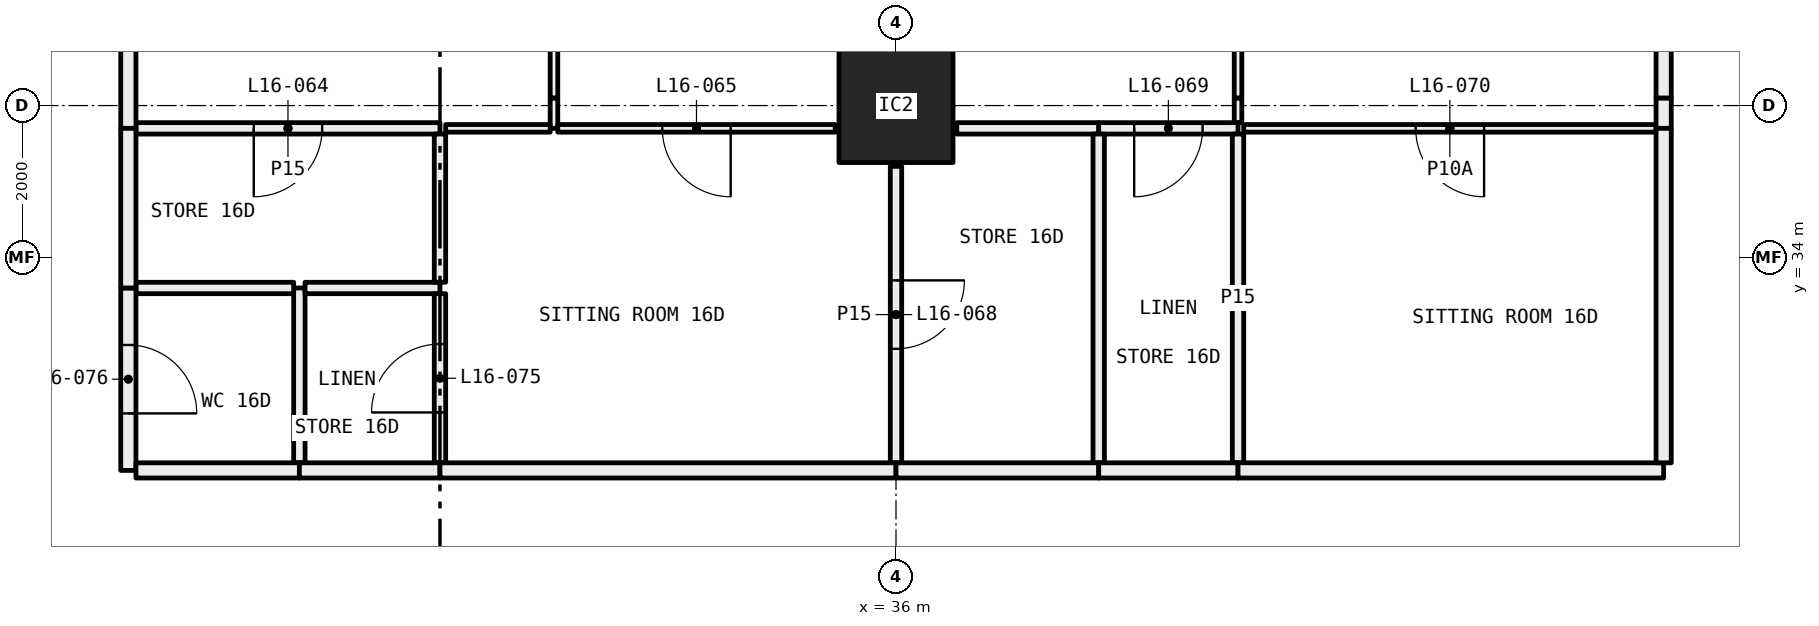
"""IFC4 building model, lengths in metres.
Left out: names, types, materials, properties, quantities, classifications, styles, units other than length and angle.
Written with IfcOpenShell. Run it as: python <this file> out.ifc"""

import sys

from ifc_helpers import new_model, si_unit, direction, frame, frame_2d, origin, origin_2d, place, context, subcontext, project, spatial, rectangle, hollow_rectangle, extrude, element, fill, save


model = new_model("IFC4")
c1 = context("Model", 3, precision=1e-05, world=origin(), true_north=direction((0.0, 1.0)))
c2 = subcontext(c1, "Body", "Model", "MODEL_VIEW")
j1 = project(units=[si_unit("LENGTHUNIT", "METRE"), si_unit("PLANEANGLEUNIT", "RADIAN")], contexts=[c1])
p1 = place(None, origin())
s1 = spatial("IfcSite", under=j1, at=p1, CompositionType="ELEMENT")
p2 = place(p1, origin())
s2 = spatial("IfcBuilding", under=s1, at=p2, CompositionType="ELEMENT")
p3 = place(p2, frame((0.0, 0.0, 67.95)))
s3 = spatial("IfcBuildingStorey", under=s2, at=p3, CompositionType="ELEMENT", Elevation=67.95)
p4 = place(p3, frame((36.0, 36.0, 0.0), z_axis=(0.0, 0.0, 1.0), x_axis=(1.0, 0.0, 0.0)))
e1 = element("IfcColumn", 1, at=p4, inside=s3, PredefinedType="COLUMN", context=c2, shape_type="SweptSolid", body=[
    extrude(hollow_rectangle(XDim=1.5, YDim=1.5, WallThickness=0.065, at=origin_2d()), origin(), (0.0, 0.0, 1.0), 3.05),
])
p5 = place(p3, frame((31.5, 35.7, 0.0), z_axis=(0.0, 0.0, 1.0), x_axis=(0.0, 1.0, 0.0)))
e2 = element("IfcWall", 2, at=p5, inside=s3, PredefinedType="PARTITIONING", context=c2, shape_type="SweptSolid", body=[
    extrude(rectangle(XDim=0.4, YDim=0.1, at=frame_2d((0.2, 0.0))), origin(), (0.0, 0.0, 1.0), 2.45),
])
p6 = place(p3, frame((31.5, 36.1, 0.0), z_axis=(0.0, 0.0, 1.0), x_axis=(0.0, 1.0, 0.0)))
e3 = element("IfcWall", 3, at=p6, inside=s3, PredefinedType="PARTITIONING", context=c2, shape_type="SweptSolid", body=[
    extrude(rectangle(XDim=5.825, YDim=0.1, at=frame_2d((2.913, 0.0))), origin(), (0.0, 0.0, 1.0), 3.05),
])
p7 = place(p6, frame((2.462, 0.0, 0.0)))
e4 = element("IfcOpeningElement", 4, at=p7, cuts=e3, PredefinedType="OPENING", context=c2, shape_type="SweptSolid", body=[
    extrude(rectangle(XDim=0.9, YDim=2.1, at=frame_2d((0.45, 1.05))), frame((0.0, 0.06, 0.0), z_axis=(0.0, -1.0, 0.0), x_axis=(1.0, 0.0, 0.0)), (0.0, 0.0, 1.0), 0.12),
])
p8 = place(p3, frame((26.0, 35.7, 0.0), z_axis=(0.0, 0.0, 1.0), x_axis=(1.0, 0.0, 0.0)))
e5 = element("IfcWall", 5, at=p8, inside=s3, PredefinedType="PARTITIONING", context=c2, shape_type="SweptSolid", body=[
    extrude(rectangle(XDim=4.0, YDim=0.15, at=frame_2d((2.0, 0.0))), origin(), (0.0, 0.0, 1.0), 3.05),
])
p9 = place(p8, frame((1.55, 0.0, 0.0)))
e6 = element("IfcOpeningElement", 6, at=p9, cuts=e5, PredefinedType="OPENING", context=c2, shape_type="SweptSolid", body=[
    extrude(rectangle(XDim=0.9, YDim=2.1, at=frame_2d((0.45, 1.05))), frame((0.0, 0.085, 0.0), z_axis=(0.0, -1.0, 0.0), x_axis=(1.0, 0.0, 0.0)), (0.0, 0.0, 1.0), 0.17),
])
p10 = place(p3, frame((30.075, 35.7, 0.0), z_axis=(0.0, 0.0, 1.0), x_axis=(1.0, 0.0, 0.0)))
e7 = element("IfcWall", 7, at=p10, inside=s3, PredefinedType="PARTITIONING", context=c2, shape_type="SweptSolid", body=[
    extrude(rectangle(XDim=1.375, YDim=0.1, at=frame_2d((0.688, 0.0))), origin(), (0.0, 0.0, 1.0), 3.05),
])
p11 = place(p3, frame((25.9, 41.9, 0.0), z_axis=(0.0, 0.0, 1.0), x_axis=(0.0, -1.0, 0.0)))
e8 = element("IfcWall", 8, at=p11, inside=s3, PredefinedType="PARTITIONING", context=c2, shape_type="SweptSolid", body=[
    extrude(rectangle(XDim=6.2, YDim=0.2, at=frame_2d((3.1, 0.0))), origin(), (0.0, 0.0, 1.0), 2.45),
])
p12 = place(p3, frame((31.55, 35.7, 0.0), z_axis=(0.0, 0.0, 1.0), x_axis=(1.0, 0.0, 0.0)))
e9 = element("IfcWall", 9, at=p12, inside=s3, PredefinedType="PARTITIONING", context=c2, shape_type="SweptSolid", body=[
    extrude(rectangle(XDim=3.65, YDim=0.1, at=frame_2d((1.825, 0.0))), origin(), (0.0, 0.0, 1.0), 3.05),
])
p13 = place(p12, frame((1.375, 0.0, 0.0)))
e10 = element("IfcOpeningElement", 10, at=p13, cuts=e9, PredefinedType="OPENING", context=c2, shape_type="SweptSolid", body=[
    extrude(rectangle(XDim=0.9, YDim=2.1, at=frame_2d((0.45, 1.05))), frame((0.0, 0.06, 0.0), z_axis=(0.0, -1.0, 0.0), x_axis=(1.0, 0.0, 0.0)), (0.0, 0.0, 1.0), 0.12),
])
p14 = place(p3, frame((28.15, 31.3, 0.0), z_axis=(0.0, 0.0, 1.0), x_axis=(0.0, 1.0, 0.0)))
e11 = element("IfcWall", 11, at=p14, inside=s3, PredefinedType="PARTITIONING", context=c2, shape_type="SweptSolid", body=[
    extrude(rectangle(XDim=2.3, YDim=0.15, at=frame_2d((1.15, 0.0))), origin(), (0.0, 0.0, 1.0), 3.05),
])
p15 = place(p3, frame((28.075, 33.6, 0.0), z_axis=(0.0, 0.0, 1.0), x_axis=(-1.0, 0.0, 0.0)))
e12 = element("IfcWall", 12, at=p15, inside=s3, PredefinedType="PARTITIONING", context=c2, shape_type="SweptSolid", body=[
    extrude(rectangle(XDim=2.075, YDim=0.15, at=frame_2d((1.038, 0.0))), origin(), (0.0, 0.0, 1.0), 3.05),
])
p16 = place(p3, frame((25.9, 33.6, 0.0), z_axis=(0.0, 0.0, 1.0), x_axis=(0.0, -1.0, 0.0)))
e13 = element("IfcWall", 13, at=p16, inside=s3, PredefinedType="PARTITIONING", context=c2, shape_type="SweptSolid", body=[
    extrude(rectangle(XDim=2.4, YDim=0.2, at=frame_2d((1.2, 0.0))), origin(), (0.0, 0.0, 1.0), 3.05),
])
p17 = place(p16, frame((0.75, 0.0, 0.0)))
e14 = element("IfcOpeningElement", 14, at=p17, cuts=e13, PredefinedType="OPENING", context=c2, shape_type="SweptSolid", body=[
    extrude(rectangle(XDim=0.9, YDim=2.1, at=frame_2d((0.45, 1.05))), frame((0.0, 0.11, 0.0), z_axis=(0.0, -1.0, 0.0), x_axis=(1.0, 0.0, 0.0)), (0.0, 0.0, 1.0), 0.22),
])
p18 = place(p3, frame((26.0, 31.2, 0.0), z_axis=(0.0, 0.0, 1.0), x_axis=(1.0, 0.0, 0.0)))
e15 = element("IfcWall", 15, at=p18, inside=s3, PredefinedType="PARTITIONING", context=c2, shape_type="SweptSolid", body=[
    extrude(rectangle(XDim=2.15, YDim=0.2, at=frame_2d((1.075, 0.0))), origin(), (0.0, 0.0, 1.0), 3.05),
])
p19 = place(p3, frame((30.0, 33.6, 0.0), z_axis=(0.0, 0.0, 1.0), x_axis=(-1.0, 0.0, 0.0)))
e16 = element("IfcWall", 16, at=p19, inside=s3, PredefinedType="PARTITIONING", context=c2, shape_type="SweptSolid", body=[
    extrude(rectangle(XDim=1.775, YDim=0.15, at=frame_2d((0.887, 0.0))), origin(), (0.0, 0.0, 1.0), 3.05),
])
p20 = place(p3, frame((30.0, 31.3, 0.0), z_axis=(0.0, 0.0, 1.0), x_axis=(0.0, 1.0, 0.0)))
e17 = element("IfcWall", 17, at=p20, inside=s3, PredefinedType="PARTITIONING", context=c2, shape_type="SweptSolid", body=[
    extrude(rectangle(XDim=2.225, YDim=0.15, at=frame_2d((1.112, 0.0))), origin(), (0.0, 0.0, 1.0), 3.05),
])
p21 = place(p20, frame((0.663, 0.0, 0.0)))
e18 = element("IfcOpeningElement", 18, at=p21, cuts=e17, PredefinedType="OPENING", context=c2, shape_type="SweptSolid", body=[
    extrude(rectangle(XDim=0.9, YDim=2.1, at=frame_2d((0.45, 1.05))), frame((0.0, 0.085, 0.0), z_axis=(0.0, -1.0, 0.0), x_axis=(1.0, 0.0, 0.0)), (0.0, 0.0, 1.0), 0.17),
])
p22 = place(p3, frame((28.15, 31.2, 0.0), z_axis=(0.0, 0.0, 1.0), x_axis=(1.0, 0.0, 0.0)))
e19 = element("IfcWall", 19, at=p22, inside=s3, PredefinedType="PARTITIONING", context=c2, shape_type="SweptSolid", body=[
    extrude(rectangle(XDim=1.85, YDim=0.2, at=frame_2d((0.925, 0.0))), origin(), (0.0, 0.0, 1.0), 3.05),
])
p23 = place(p3, frame((30.0, 33.675, 0.0), z_axis=(0.0, 0.0, 1.0), x_axis=(0.0, 1.0, 0.0)))
e20 = element("IfcWall", 20, at=p23, inside=s3, PredefinedType="PARTITIONING", context=c2, shape_type="SweptSolid", body=[
    extrude(rectangle(XDim=1.95, YDim=0.15, at=frame_2d((0.975, 0.0))), origin(), (0.0, 0.0, 1.0), 3.05),
])
p24 = place(p3, frame((25.9, 35.7, 0.0), z_axis=(0.0, 0.0, 1.0), x_axis=(0.0, -1.0, 0.0)))
e21 = element("IfcWall", 21, at=p24, inside=s3, PredefinedType="PARTITIONING", context=c2, shape_type="SweptSolid", body=[
    extrude(rectangle(XDim=2.1, YDim=0.2, at=frame_2d((1.05, 0.0))), origin(), (0.0, 0.0, 1.0), 3.05),
])
p25 = place(p3, frame((36.0, 31.3, 0.0), z_axis=(0.0, 0.0, 1.0), x_axis=(0.0, 1.0, 0.0)))
e22 = element("IfcWall", 22, at=p25, inside=s3, PredefinedType="PARTITIONING", context=c2, shape_type="SweptSolid", body=[
    extrude(rectangle(XDim=3.9, YDim=0.15, at=frame_2d((1.95, 0.0))), origin(), (0.0, 0.0, 1.0), 2.45),
])
p26 = place(p25, frame((1.5, 0.0, 0.0)))
e23 = element("IfcOpeningElement", 23, at=p26, cuts=e22, PredefinedType="OPENING", context=c2, shape_type="SweptSolid", body=[
    extrude(rectangle(XDim=0.9, YDim=2.1, at=frame_2d((0.45, 1.05))), frame((0.0, 0.085, 0.0), z_axis=(0.0, -1.0, 0.0), x_axis=(1.0, 0.0, 0.0)), (0.0, 0.0, 1.0), 0.17),
])
p27 = place(p3, frame((30.0, 31.2, 0.0), z_axis=(0.0, 0.0, 1.0), x_axis=(1.0, 0.0, 0.0)))
e24 = element("IfcWall", 24, at=p27, inside=s3, PredefinedType="PARTITIONING", context=c2, shape_type="SweptSolid", body=[
    extrude(rectangle(XDim=6.0, YDim=0.2, at=frame_2d((3.0, 0.0))), origin(), (0.0, 0.0, 1.0), 2.45),
])
p28 = place(p3, frame((40.5, 35.775, 0.0), z_axis=(0.0, 0.0, 1.0), x_axis=(0.0, 1.0, 0.0)))
e25 = element("IfcWall", 25, at=p28, inside=s3, PredefinedType="PARTITIONING", context=c2, shape_type="SweptSolid", body=[
    extrude(rectangle(XDim=0.325, YDim=0.1, at=frame_2d((0.163, 0.0))), origin(), (0.0, 0.0, 1.0), 2.45),
])
p29 = place(p3, frame((40.5, 36.1, 0.0), z_axis=(0.0, 0.0, 1.0), x_axis=(0.0, 1.0, 0.0)))
e26 = element("IfcWall", 26, at=p29, inside=s3, PredefinedType="PARTITIONING", context=c2, shape_type="SweptSolid", body=[
    extrude(rectangle(XDim=5.85, YDim=0.1, at=frame_2d((2.925, 0.0))), origin(), (0.0, 0.0, 1.0), 3.05),
])
p30 = place(p29, frame((2.475, 0.0, 0.0)))
e27 = element("IfcOpeningElement", 27, at=p30, cuts=e26, PredefinedType="OPENING", context=c2, shape_type="SweptSolid", body=[
    extrude(rectangle(XDim=0.9, YDim=2.1, at=frame_2d((0.45, 1.05))), frame((0.0, 0.06, 0.0), z_axis=(0.0, -1.0, 0.0), x_axis=(1.0, 0.0, 0.0)), (0.0, 0.0, 1.0), 0.12),
])
p31 = place(p3, frame((36.8, 35.7, 0.0), z_axis=(0.0, 0.0, 1.0), x_axis=(1.0, 0.0, 0.0)))
e28 = element("IfcWall", 28, at=p31, inside=s3, PredefinedType="PARTITIONING", context=c2, shape_type="SweptSolid", body=[
    extrude(rectangle(XDim=1.867, YDim=0.15, at=frame_2d((0.934, 0.0))), origin(), (0.0, 0.0, 1.0), 3.05),
])
p32 = place(p3, frame((38.667, 35.7, 0.0), z_axis=(0.0, 0.0, 1.0), x_axis=(1.0, 0.0, 0.0)))
e29 = element("IfcWall", 29, at=p32, inside=s3, PredefinedType="PARTITIONING", context=c2, shape_type="SweptSolid", body=[
    extrude(rectangle(XDim=1.833, YDim=0.15, at=frame_2d((0.917, 0.0))), origin(), (0.0, 0.0, 1.0), 3.05),
])
p33 = place(p32, frame((0.467, 0.0, 0.0)))
e30 = element("IfcOpeningElement", 30, at=p33, cuts=e29, PredefinedType="OPENING", context=c2, shape_type="SweptSolid", body=[
    extrude(rectangle(XDim=0.9, YDim=2.1, at=frame_2d((0.45, 1.05))), frame((0.0, 0.085, 0.0), z_axis=(0.0, -1.0, 0.0), x_axis=(1.0, 0.0, 0.0)), (0.0, 0.0, 1.0), 0.17),
])
p34 = place(p3, frame((40.575, 35.7, 0.0), z_axis=(0.0, 0.0, 1.0), x_axis=(1.0, 0.0, 0.0)))
e31 = element("IfcWall", 31, at=p34, inside=s3, PredefinedType="PARTITIONING", context=c2, shape_type="SweptSolid", body=[
    extrude(rectangle(XDim=5.425, YDim=0.1, at=frame_2d((2.712, 0.0))), origin(), (0.0, 0.0, 1.0), 3.05),
])
p35 = place(p34, frame((2.262, 0.0, 0.0)))
e32 = element("IfcOpeningElement", 32, at=p35, cuts=e31, PredefinedType="OPENING", context=c2, shape_type="SweptSolid", body=[
    extrude(rectangle(XDim=0.9, YDim=2.1, at=frame_2d((0.45, 1.05))), frame((0.0, 0.06, 0.0), z_axis=(0.0, -1.0, 0.0), x_axis=(1.0, 0.0, 0.0)), (0.0, 0.0, 1.0), 0.12),
])
p36 = place(p3, frame((46.1, 35.7, 0.0), z_axis=(0.0, 0.0, 1.0), x_axis=(0.0, 1.0, 0.0)))
e33 = element("IfcWall", 33, at=p36, inside=s3, PredefinedType="PARTITIONING", context=c2, shape_type="SweptSolid", body=[
    extrude(rectangle(XDim=0.4, YDim=0.2, at=frame_2d((0.2, 0.0))), origin(), (0.0, 0.0, 1.0), 2.45),
])
p37 = place(p3, frame((46.1, 36.1, 0.0), z_axis=(0.0, 0.0, 1.0), x_axis=(0.0, 1.0, 0.0)))
e34 = element("IfcWall", 34, at=p37, inside=s3, PredefinedType="PARTITIONING", context=c2, shape_type="SweptSolid", body=[
    extrude(rectangle(XDim=5.8, YDim=0.2, at=frame_2d((2.9, 0.0))), origin(), (0.0, 0.0, 1.0), 3.05),
])
p38 = place(p3, frame((38.667, 31.3, 0.0), z_axis=(0.0, 0.0, 1.0), x_axis=(0.0, 1.0, 0.0)))
e35 = element("IfcWall", 35, at=p38, inside=s3, PredefinedType="PARTITIONING", context=c2, shape_type="SweptSolid", body=[
    extrude(rectangle(XDim=4.325, YDim=0.15, at=frame_2d((2.163, 0.0))), origin(), (0.0, 0.0, 1.0), 3.05),
])
p39 = place(p3, frame((36.0, 31.2, 0.0), z_axis=(0.0, 0.0, 1.0), x_axis=(1.0, 0.0, 0.0)))
e36 = element("IfcWall", 36, at=p39, inside=s3, PredefinedType="PARTITIONING", context=c2, shape_type="SweptSolid", body=[
    extrude(rectangle(XDim=2.667, YDim=0.2, at=frame_2d((1.333, 0.0))), origin(), (0.0, 0.0, 1.0), 2.45),
])
p40 = place(p3, frame((40.5, 31.3, 0.0), z_axis=(0.0, 0.0, 1.0), x_axis=(0.0, 1.0, 0.0)))
e37 = element("IfcWall", 37, at=p40, inside=s3, PredefinedType="PARTITIONING", context=c2, shape_type="SweptSolid", body=[
    extrude(rectangle(XDim=4.325, YDim=0.15, at=frame_2d((2.163, 0.0))), origin(), (0.0, 0.0, 1.0), 3.05),
])
p41 = place(p3, frame((38.667, 31.2, 0.0), z_axis=(0.0, 0.0, 1.0), x_axis=(1.0, 0.0, 0.0)))
e38 = element("IfcWall", 38, at=p41, inside=s3, PredefinedType="PARTITIONING", context=c2, shape_type="SweptSolid", body=[
    extrude(rectangle(XDim=1.833, YDim=0.2, at=frame_2d((0.917, 0.0))), origin(), (0.0, 0.0, 1.0), 3.05),
])
p42 = place(p3, frame((40.5, 31.2, 0.0), z_axis=(0.0, 0.0, 1.0), x_axis=(1.0, 0.0, 0.0)))
e39 = element("IfcWall", 39, at=p42, inside=s3, PredefinedType="PARTITIONING", context=c2, shape_type="SweptSolid", body=[
    extrude(rectangle(XDim=5.6, YDim=0.2, at=frame_2d((2.8, 0.0))), origin(), (0.0, 0.0, 1.0), 3.05),
])
p43 = place(p3, frame((46.1, 31.3, 0.0), z_axis=(0.0, 0.0, 1.0), x_axis=(0.0, 1.0, 0.0)))
e40 = element("IfcWall", 40, at=p43, inside=s3, PredefinedType="PARTITIONING", context=c2, shape_type="SweptSolid", body=[
    extrude(rectangle(XDim=4.4, YDim=0.2, at=frame_2d((2.2, 0.0))), origin(), (0.0, 0.0, 1.0), 3.05),
])
p44 = place(p9, frame((0.9, 0.0, 0.0), x_axis=(-1.0, 0.0, 0.0)))
e41 = element("IfcDoor", 41, at=p44, inside=s3, OperationType="SINGLE_SWING_LEFT", PredefinedType="DOOR", context=c2, shape_type="SweptSolid", body=[
    extrude(rectangle(XDim=0.9, YDim=2.1, at=frame_2d((0.45, 1.05))), frame((0.0, 0.025, 0.0), z_axis=(0.0, -1.0, 0.0), x_axis=(1.0, 0.0, 0.0)), (0.0, 0.0, 1.0), 0.05),
])
fill(e6, e41)
p45 = place(p13, frame((0.9, 0.0, 0.0), x_axis=(-1.0, 0.0, 0.0)))
e42 = element("IfcDoor", 42, at=p45, inside=s3, OperationType="SINGLE_SWING_RIGHT", PredefinedType="DOOR", context=c2, shape_type="SweptSolid", body=[
    extrude(rectangle(XDim=0.9, YDim=2.1, at=frame_2d((0.45, 1.05))), frame((0.0, 0.025, 0.0), z_axis=(0.0, -1.0, 0.0), x_axis=(1.0, 0.0, 0.0)), (0.0, 0.0, 1.0), 0.05),
])
fill(e10, e42)
p46 = place(p26, frame((0.9, 0.0, 0.0), x_axis=(-1.0, 0.0, 0.0)))
e43 = element("IfcDoor", 43, at=p46, inside=s3, OperationType="SINGLE_SWING_RIGHT", PredefinedType="DOOR", context=c2, shape_type="SweptSolid", body=[
    extrude(rectangle(XDim=0.9, YDim=2.1, at=frame_2d((0.45, 1.05))), frame((0.0, 0.025, 0.0), z_axis=(0.0, -1.0, 0.0), x_axis=(1.0, 0.0, 0.0)), (0.0, 0.0, 1.0), 0.05),
])
fill(e23, e43)
p47 = place(p33, frame((0.9, 0.0, 0.0), x_axis=(-1.0, 0.0, 0.0)))
e44 = element("IfcDoor", 44, at=p47, inside=s3, OperationType="SINGLE_SWING_LEFT", PredefinedType="DOOR", context=c2, shape_type="SweptSolid", body=[
    extrude(rectangle(XDim=0.9, YDim=2.1, at=frame_2d((0.45, 1.05))), frame((0.0, 0.025, 0.0), z_axis=(0.0, -1.0, 0.0), x_axis=(1.0, 0.0, 0.0)), (0.0, 0.0, 1.0), 0.05),
])
fill(e30, e44)
p48 = place(p35, frame((0.9, 0.0, 0.0), x_axis=(-1.0, 0.0, 0.0)))
e45 = element("IfcDoor", 45, at=p48, inside=s3, OperationType="SINGLE_SWING_RIGHT", PredefinedType="DOOR", context=c2, shape_type="SweptSolid", body=[
    extrude(rectangle(XDim=0.9, YDim=2.1, at=frame_2d((0.45, 1.05))), frame((0.0, 0.025, 0.0), z_axis=(0.0, -1.0, 0.0), x_axis=(1.0, 0.0, 0.0)), (0.0, 0.0, 1.0), 0.05),
])
fill(e32, e45)
p49 = place(p21, origin())
e46 = element("IfcDoor", 46, at=p49, inside=s3, OperationType="SINGLE_SWING_RIGHT", PredefinedType="DOOR", context=c2, shape_type="SweptSolid", body=[
    extrude(rectangle(XDim=0.9, YDim=2.1, at=frame_2d((0.45, 1.05))), frame((0.0, 0.025, 0.0), z_axis=(0.0, -1.0, 0.0), x_axis=(1.0, 0.0, 0.0)), (0.0, 0.0, 1.0), 0.05),
])
fill(e18, e46)
p50 = place(p17, origin())
e47 = element("IfcDoor", 47, at=p50, inside=s3, OperationType="SINGLE_SWING_LEFT", PredefinedType="DOOR", context=c2, shape_type="SweptSolid", body=[
    extrude(rectangle(XDim=0.9, YDim=2.1, at=frame_2d((0.45, 1.05))), frame((0.0, 0.025, 0.0), z_axis=(0.0, -1.0, 0.0), x_axis=(1.0, 0.0, 0.0)), (0.0, 0.0, 1.0), 0.05),
])
fill(e14, e47)
save(model, sys.argv[1])
